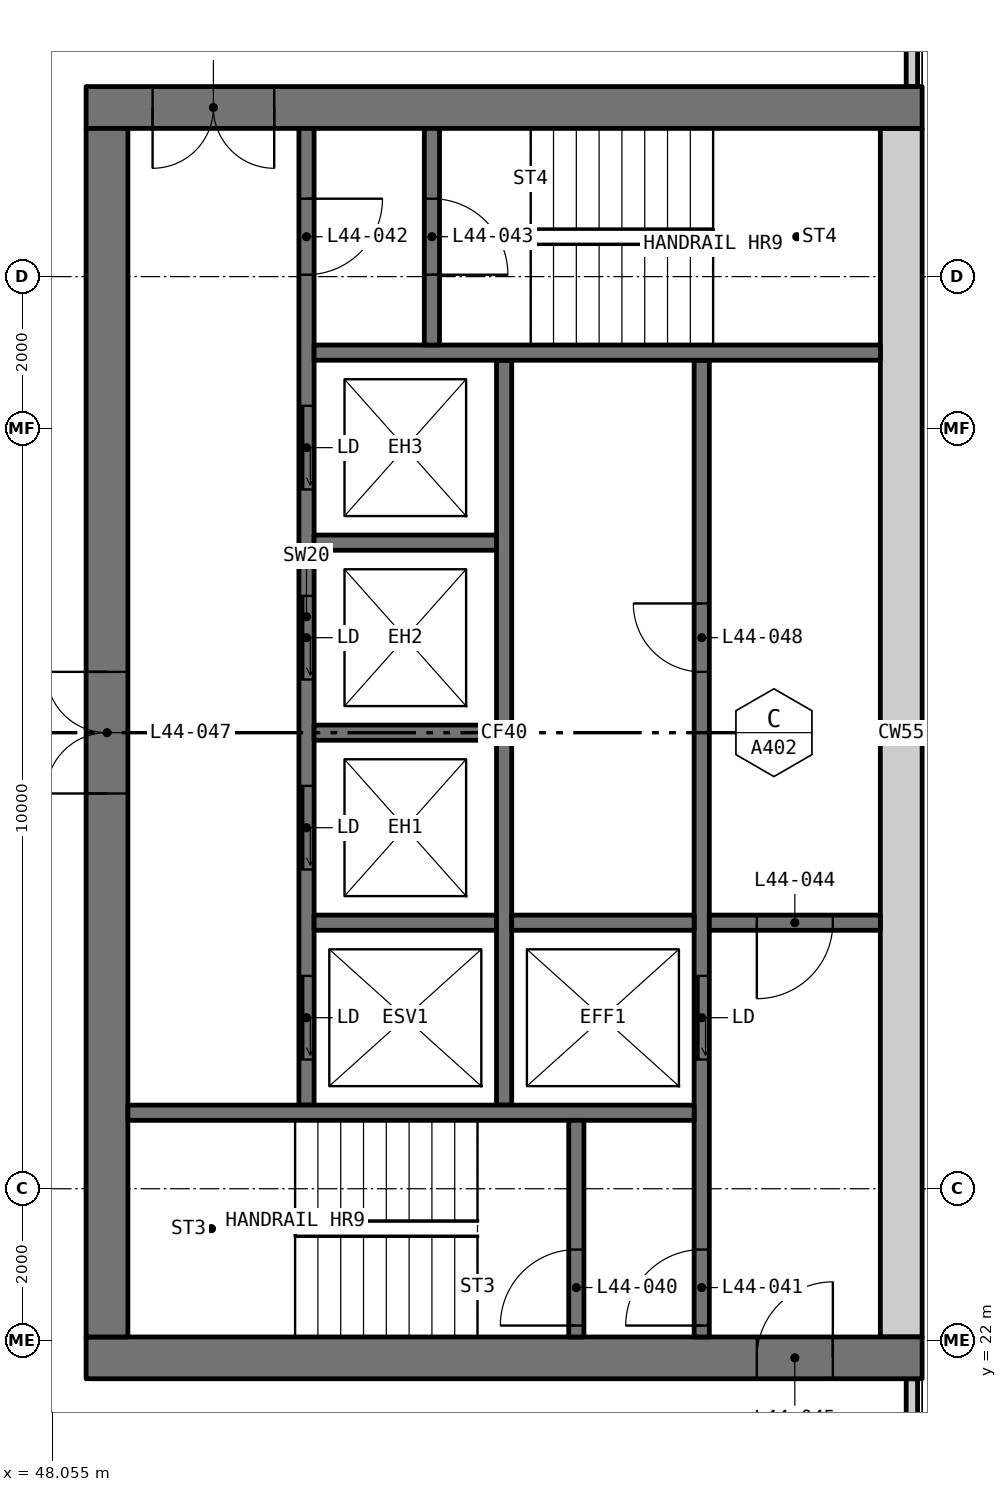
"""IFC4 building model, lengths in metres.
Left out: names, types, materials, properties, quantities, classifications, styles, units other than length and angle.
Written with IfcOpenShell. Run it as: python <this file> out.ifc"""

import sys

from ifc_helpers import new_model, si_unit, direction, frame, frame_2d, origin, place, context, subcontext, project, spatial, rectangle, extrude, element, fill, save


model = new_model("IFC4")
c1 = context("Model", 3, precision=1e-05, world=origin(), true_north=direction((0.0, 1.0)))
c2 = subcontext(c1, "Body", "Model", "MODEL_VIEW")
j1 = project(units=[si_unit("LENGTHUNIT", "METRE"), si_unit("PLANEANGLEUNIT", "RADIAN")], contexts=[c1])
p1 = place(None, origin())
s1 = spatial("IfcSite", under=j1, at=p1, CompositionType="ELEMENT")
p2 = place(p1, origin())
s2 = spatial("IfcBuilding", under=s1, at=p2, CompositionType="ELEMENT")
p3 = place(p2, frame((0.0, 0.0, 168.6)))
s3 = spatial("IfcBuildingStorey", under=s2, at=p3, CompositionType="ELEMENT", Elevation=168.6)
for number, where, z_axis, x_axis in (
    (1, (59.365, 18.71, 0.0), (0.0, 0.0, 1.0), (0.0, 1.0, 0.0)),
    (2, (59.365, 38.5, 0.0), (0.0, 0.0, 1.0), (0.0, 1.0, 0.0)),
):
    element("IfcWall", number, at=place(p3, frame(where, z_axis=z_axis, x_axis=x_axis)), inside=s3, PredefinedType="ELEMENTEDWALL", context=c2, shape_type="SweptSolid", body=[
        extrude(rectangle(XDim=2.79, YDim=0.15, at=frame_2d((1.395, 0.0))), origin(), (0.0, 0.0, 1.0), 3.05),
    ])
p4 = place(p3, frame((59.5, 21.775, 0.0), z_axis=(0.0, 0.0, 1.0), x_axis=(-1.0, 0.0, 0.0)))
e3 = element("IfcWall", 3, at=p4, inside=s3, PredefinedType="SHEAR", context=c2, shape_type="SweptSolid", body=[
    extrude(rectangle(XDim=11.0, YDim=0.55, at=frame_2d((5.5, 0.0))), origin(), (0.0, 0.0, 1.0), 3.05),
])
p5 = place(p4, frame((1.175, 0.0, 0.0)))
e4 = element("IfcOpeningElement", 4, at=p5, cuts=e3, PredefinedType="OPENING", context=c2, shape_type="SweptSolid", body=[
    extrude(rectangle(XDim=1.0, YDim=2.1, at=frame_2d((0.5, 1.05))), frame((0.0, 0.285, 0.0), z_axis=(0.0, -1.0, 0.0), x_axis=(1.0, 0.0, 0.0)), (0.0, 0.0, 1.0), 0.57),
])
p6 = place(p3, frame((59.5, 38.225, 0.0), z_axis=(0.0, 0.0, 1.0), x_axis=(-1.0, 0.0, 0.0)))
e5 = element("IfcWall", 5, at=p6, inside=s3, PredefinedType="SHEAR", context=c2, shape_type="SweptSolid", body=[
    extrude(rectangle(XDim=11.0, YDim=0.55, at=frame_2d((5.5, 0.0))), origin(), (0.0, 0.0, 1.0), 3.05),
])
p7 = place(p6, frame((8.525, 0.0, 0.0)))
e6 = element("IfcOpeningElement", 6, at=p7, cuts=e5, PredefinedType="OPENING", context=c2, shape_type="SweptSolid", body=[
    extrude(rectangle(XDim=1.6, YDim=2.1, at=frame_2d((0.8, 1.05))), frame((0.0, 0.285, 0.0), z_axis=(0.0, -1.0, 0.0), x_axis=(1.0, 0.0, 0.0)), (0.0, 0.0, 1.0), 0.57),
])
p8 = place(p3, frame((59.225, 22.05, 0.0), z_axis=(0.0, 0.0, 1.0), x_axis=(0.0, 1.0, 0.0)))
e7 = element("IfcWall", 7, at=p8, inside=s3, PredefinedType="SHEAR", context=c2, shape_type="SweptSolid", body=[
    extrude(rectangle(XDim=15.9, YDim=0.55, at=frame_2d((7.95, 0.0))), origin(), (0.0, 0.0, 1.0), 3.05),
])
p9 = place(p3, frame((48.775, 22.05, 0.0), z_axis=(0.0, 0.0, 1.0), x_axis=(0.0, 1.0, 0.0)))
e8 = element("IfcWall", 8, at=p9, inside=s3, PredefinedType="SHEAR", context=c2, shape_type="SweptSolid", body=[
    extrude(rectangle(XDim=15.9, YDim=0.55, at=frame_2d((7.95, 0.0))), origin(), (0.0, 0.0, 1.0), 3.05),
])
p10 = place(p9, frame((7.15, 0.0, 0.0)))
e9 = element("IfcOpeningElement", 9, at=p10, cuts=e8, PredefinedType="OPENING", context=c2, shape_type="SweptSolid", body=[
    extrude(rectangle(XDim=1.6, YDim=2.1, at=frame_2d((0.8, 1.05))), frame((0.0, 0.285, 0.0), z_axis=(0.0, -1.0, 0.0), x_axis=(1.0, 0.0, 0.0)), (0.0, 0.0, 1.0), 0.57),
])
p11 = place(p3, frame((56.6, 22.05, 0.0), z_axis=(0.0, 0.0, 1.0), x_axis=(0.0, 1.0, 0.0)))
e10 = element("IfcWall", 10, at=p11, inside=s3, PredefinedType="SOLIDWALL", context=c2, shape_type="SweptSolid", body=[
    extrude(rectangle(XDim=12.85, YDim=0.2, at=frame_2d((6.425, 0.0))), origin(), (0.0, 0.0, 1.0), 3.05),
])
p12 = place(p11, frame((3.65, 0.0, 0.0)))
e11 = element("IfcOpeningElement", 11, at=p12, cuts=e10, PredefinedType="OPENING", context=c2, shape_type="SweptSolid", body=[
    extrude(rectangle(XDim=1.1, YDim=2.1, at=frame_2d((0.55, 1.05))), frame((0.0, 0.11, 0.0), z_axis=(0.0, -1.0, 0.0), x_axis=(1.0, 0.0, 0.0)), (0.0, 0.0, 1.0), 0.22),
])
p13 = place(p11, frame((0.15, 0.0, 0.0)))
e12 = element("IfcOpeningElement", 12, at=p13, cuts=e10, PredefinedType="OPENING", context=c2, shape_type="SweptSolid", body=[
    extrude(rectangle(XDim=1.0, YDim=2.1, at=frame_2d((0.5, 1.05))), frame((0.0, 0.11, 0.0), z_axis=(0.0, -1.0, 0.0), x_axis=(1.0, 0.0, 0.0)), (0.0, 0.0, 1.0), 0.22),
])
p14 = place(p11, frame((8.75, 0.0, 0.0)))
e13 = element("IfcOpeningElement", 13, at=p14, cuts=e10, PredefinedType="OPENING", context=c2, shape_type="SweptSolid", body=[
    extrude(rectangle(XDim=0.9, YDim=2.1, at=frame_2d((0.45, 1.05))), frame((0.0, 0.11, 0.0), z_axis=(0.0, -1.0, 0.0), x_axis=(1.0, 0.0, 0.0)), (0.0, 0.0, 1.0), 0.22),
])
p15 = place(p3, frame((51.4, 25.1, 0.0), z_axis=(0.0, 0.0, 1.0), x_axis=(0.0, 1.0, 0.0)))
e14 = element("IfcWall", 14, at=p15, inside=s3, PredefinedType="SOLIDWALL", context=c2, shape_type="SweptSolid", body=[
    extrude(rectangle(XDim=12.85, YDim=0.2, at=frame_2d((6.425, 0.0))), origin(), (0.0, 0.0, 1.0), 3.05),
])
p16 = place(p15, frame((0.6, 0.0, 0.0)))
e15 = element("IfcOpeningElement", 15, at=p16, cuts=e14, PredefinedType="OPENING", context=c2, shape_type="SweptSolid", body=[
    extrude(rectangle(XDim=1.1, YDim=2.1, at=frame_2d((0.55, 1.05))), frame((0.0, 0.11, 0.0), z_axis=(0.0, -1.0, 0.0), x_axis=(1.0, 0.0, 0.0)), (0.0, 0.0, 1.0), 0.22),
])
p17 = place(p15, frame((3.1, 0.0, 0.0)))
e16 = element("IfcOpeningElement", 16, at=p17, cuts=e14, PredefinedType="OPENING", context=c2, shape_type="SweptSolid", body=[
    extrude(rectangle(XDim=1.1, YDim=2.1, at=frame_2d((0.55, 1.05))), frame((0.0, 0.11, 0.0), z_axis=(0.0, -1.0, 0.0), x_axis=(1.0, 0.0, 0.0)), (0.0, 0.0, 1.0), 0.22),
])
p18 = place(p15, frame((5.6, 0.0, 0.0)))
e17 = element("IfcOpeningElement", 17, at=p18, cuts=e14, PredefinedType="OPENING", context=c2, shape_type="SweptSolid", body=[
    extrude(rectangle(XDim=1.1, YDim=2.1, at=frame_2d((0.55, 1.05))), frame((0.0, 0.11, 0.0), z_axis=(0.0, -1.0, 0.0), x_axis=(1.0, 0.0, 0.0)), (0.0, 0.0, 1.0), 0.22),
])
p19 = place(p15, frame((8.1, 0.0, 0.0)))
e18 = element("IfcOpeningElement", 18, at=p19, cuts=e14, PredefinedType="OPENING", context=c2, shape_type="SweptSolid", body=[
    extrude(rectangle(XDim=1.1, YDim=2.1, at=frame_2d((0.55, 1.05))), frame((0.0, 0.11, 0.0), z_axis=(0.0, -1.0, 0.0), x_axis=(1.0, 0.0, 0.0)), (0.0, 0.0, 1.0), 0.22),
])
p20 = place(p15, frame((10.925, 0.0, 0.0)))
e19 = element("IfcOpeningElement", 19, at=p20, cuts=e14, PredefinedType="OPENING", context=c2, shape_type="SweptSolid", body=[
    extrude(rectangle(XDim=1.0, YDim=2.1, at=frame_2d((0.5, 1.05))), frame((0.0, 0.11, 0.0), z_axis=(0.0, -1.0, 0.0), x_axis=(1.0, 0.0, 0.0)), (0.0, 0.0, 1.0), 0.22),
])
p21 = place(p3, frame((54.0, 25.1, 0.0), z_axis=(0.0, 0.0, 1.0), x_axis=(0.0, 1.0, 0.0)))
e20 = element("IfcWall", 20, at=p21, inside=s3, PredefinedType="SOLIDWALL", context=c2, shape_type="SweptSolid", body=[
    extrude(rectangle(XDim=9.8, YDim=0.2, at=frame_2d((4.9, 0.0))), origin(), (0.0, 0.0, 1.0), 3.05),
])
for number, where, z_axis, x_axis in (
    (21, (56.5, 25.0, 0.0), (0.0, 0.0, 1.0), (-1.0, 0.0, 0.0)),
    (22, (58.95, 35.0, 0.0), (0.0, 0.0, 1.0), (-1.0, 0.0, 0.0)),
):
    element("IfcWall", number, at=place(p3, frame(where, z_axis=z_axis, x_axis=x_axis)), inside=s3, PredefinedType="SOLIDWALL", context=c2, shape_type="SweptSolid", body=[
        extrude(rectangle(XDim=7.45, YDim=0.2, at=frame_2d((3.725, 0.0))), origin(), (0.0, 0.0, 1.0), 3.05),
    ])
p22 = place(p3, frame((58.95, 27.5, 0.0), z_axis=(0.0, 0.0, 1.0), x_axis=(-1.0, 0.0, 0.0)))
e23 = element("IfcWall", 23, at=p22, inside=s3, PredefinedType="SOLIDWALL", context=c2, shape_type="SweptSolid", body=[
    extrude(rectangle(XDim=2.25, YDim=0.2, at=frame_2d((1.125, 0.0))), origin(), (0.0, 0.0, 1.0), 3.05),
])
p23 = place(p22, frame((0.625, 0.0, 0.0)))
e24 = element("IfcOpeningElement", 24, at=p23, cuts=e23, PredefinedType="OPENING", context=c2, shape_type="SweptSolid", body=[
    extrude(rectangle(XDim=1.0, YDim=2.1, at=frame_2d((0.5, 1.05))), frame((0.0, 0.11, 0.0), z_axis=(0.0, -1.0, 0.0), x_axis=(1.0, 0.0, 0.0)), (0.0, 0.0, 1.0), 0.22),
])
p24 = place(p3, frame((54.95, 22.05, 0.0), z_axis=(0.0, 0.0, 1.0), x_axis=(0.0, 1.0, 0.0)))
e25 = element("IfcWall", 25, at=p24, inside=s3, PredefinedType="SOLIDWALL", context=c2, shape_type="SweptSolid", body=[
    extrude(rectangle(XDim=2.85, YDim=0.2, at=frame_2d((1.425, 0.0))), origin(), (0.0, 0.0, 1.0), 3.05),
])
p25 = place(p24, frame((0.15, 0.0, 0.0)))
e26 = element("IfcOpeningElement", 26, at=p25, cuts=e25, PredefinedType="OPENING", context=c2, shape_type="SweptSolid", body=[
    extrude(rectangle(XDim=1.0, YDim=2.1, at=frame_2d((0.5, 1.05))), frame((0.0, 0.11, 0.0), z_axis=(0.0, -1.0, 0.0), x_axis=(1.0, 0.0, 0.0)), (0.0, 0.0, 1.0), 0.22),
])
p26 = place(p3, frame((53.05, 35.1, 0.0), z_axis=(0.0, 0.0, 1.0), x_axis=(0.0, 1.0, 0.0)))
e27 = element("IfcWall", 27, at=p26, inside=s3, PredefinedType="SOLIDWALL", context=c2, shape_type="SweptSolid", body=[
    extrude(rectangle(XDim=2.85, YDim=0.2, at=frame_2d((1.425, 0.0))), origin(), (0.0, 0.0, 1.0), 3.05),
])
p27 = place(p26, frame((0.925, 0.0, 0.0)))
e28 = element("IfcOpeningElement", 28, at=p27, cuts=e27, PredefinedType="OPENING", context=c2, shape_type="SweptSolid", body=[
    extrude(rectangle(XDim=1.0, YDim=2.1, at=frame_2d((0.5, 1.05))), frame((0.0, 0.11, 0.0), z_axis=(0.0, -1.0, 0.0), x_axis=(1.0, 0.0, 0.0)), (0.0, 0.0, 1.0), 0.22),
])
for number, where, z_axis, x_axis in (
    (29, (56.5, 27.5, 0.0), (0.0, 0.0, 1.0), (-1.0, 0.0, 0.0)),
    (30, (53.9, 27.5, 0.0), (0.0, 0.0, 1.0), (-1.0, 0.0, 0.0)),
    (31, (53.9, 30.0, 0.0), (0.0, 0.0, 1.0), (-1.0, 0.0, 0.0)),
    (32, (53.9, 32.5, 0.0), (0.0, 0.0, 1.0), (-1.0, 0.0, 0.0)),
):
    element("IfcWall", number, at=place(p3, frame(where, z_axis=z_axis, x_axis=x_axis)), inside=s3, PredefinedType="SOLIDWALL", context=c2, shape_type="SweptSolid", body=[
        extrude(rectangle(XDim=2.4, YDim=0.2, at=frame_2d((1.2, 0.0))), origin(), (0.0, 0.0, 1.0), 3.05),
    ])
p28 = place(p16, origin())
e33 = element("IfcDoor", 33, at=p28, inside=s3, OperationType="SLIDING_TO_LEFT", PredefinedType="DOOR", context=c2, shape_type="SweptSolid", body=[
    extrude(rectangle(XDim=1.1, YDim=2.1, at=frame_2d((0.55, 1.05))), frame((0.0, 0.025, 0.0), z_axis=(0.0, -1.0, 0.0), x_axis=(1.0, 0.0, 0.0)), (0.0, 0.0, 1.0), 0.05),
])
fill(e15, e33)
p29 = place(p17, origin())
e34 = element("IfcDoor", 34, at=p29, inside=s3, OperationType="SLIDING_TO_LEFT", PredefinedType="DOOR", context=c2, shape_type="SweptSolid", body=[
    extrude(rectangle(XDim=1.1, YDim=2.1, at=frame_2d((0.55, 1.05))), frame((0.0, 0.025, 0.0), z_axis=(0.0, -1.0, 0.0), x_axis=(1.0, 0.0, 0.0)), (0.0, 0.0, 1.0), 0.05),
])
fill(e16, e34)
p30 = place(p18, origin())
e35 = element("IfcDoor", 35, at=p30, inside=s3, OperationType="SLIDING_TO_LEFT", PredefinedType="DOOR", context=c2, shape_type="SweptSolid", body=[
    extrude(rectangle(XDim=1.1, YDim=2.1, at=frame_2d((0.55, 1.05))), frame((0.0, 0.025, 0.0), z_axis=(0.0, -1.0, 0.0), x_axis=(1.0, 0.0, 0.0)), (0.0, 0.0, 1.0), 0.05),
])
fill(e17, e35)
p31 = place(p19, origin())
e36 = element("IfcDoor", 36, at=p31, inside=s3, OperationType="SLIDING_TO_LEFT", PredefinedType="DOOR", context=c2, shape_type="SweptSolid", body=[
    extrude(rectangle(XDim=1.1, YDim=2.1, at=frame_2d((0.55, 1.05))), frame((0.0, 0.025, 0.0), z_axis=(0.0, -1.0, 0.0), x_axis=(1.0, 0.0, 0.0)), (0.0, 0.0, 1.0), 0.05),
])
fill(e18, e36)
p32 = place(p12, origin())
e37 = element("IfcDoor", 37, at=p32, inside=s3, OperationType="SLIDING_TO_LEFT", PredefinedType="DOOR", context=c2, shape_type="SweptSolid", body=[
    extrude(rectangle(XDim=1.1, YDim=2.1, at=frame_2d((0.55, 1.05))), frame((0.0, 0.025, 0.0), z_axis=(0.0, -1.0, 0.0), x_axis=(1.0, 0.0, 0.0)), (0.0, 0.0, 1.0), 0.05),
])
fill(e11, e37)
p33 = place(p25, origin())
e38 = element("IfcDoor", 38, at=p33, inside=s3, OperationType="SINGLE_SWING_RIGHT", PredefinedType="DOOR", context=c2, shape_type="SweptSolid", body=[
    extrude(rectangle(XDim=1.0, YDim=2.1, at=frame_2d((0.5, 1.05))), frame((0.0, 0.025, 0.0), z_axis=(0.0, -1.0, 0.0), x_axis=(1.0, 0.0, 0.0)), (0.0, 0.0, 1.0), 0.05),
])
fill(e26, e38)
p34 = place(p13, origin())
e39 = element("IfcDoor", 39, at=p34, inside=s3, OperationType="SINGLE_SWING_RIGHT", PredefinedType="DOOR", context=c2, shape_type="SweptSolid", body=[
    extrude(rectangle(XDim=1.0, YDim=2.1, at=frame_2d((0.5, 1.05))), frame((0.0, 0.025, 0.0), z_axis=(0.0, -1.0, 0.0), x_axis=(1.0, 0.0, 0.0)), (0.0, 0.0, 1.0), 0.05),
])
fill(e12, e39)
p35 = place(p20, frame((1.0, 0.0, 0.0), x_axis=(-1.0, 0.0, 0.0)))
e40 = element("IfcDoor", 40, at=p35, inside=s3, OperationType="SINGLE_SWING_RIGHT", PredefinedType="DOOR", context=c2, shape_type="SweptSolid", body=[
    extrude(rectangle(XDim=1.0, YDim=2.1, at=frame_2d((0.5, 1.05))), frame((0.0, 0.025, 0.0), z_axis=(0.0, -1.0, 0.0), x_axis=(1.0, 0.0, 0.0)), (0.0, 0.0, 1.0), 0.05),
])
fill(e19, e40)
p36 = place(p27, frame((1.0, 0.0, 0.0), x_axis=(-1.0, 0.0, 0.0)))
e41 = element("IfcDoor", 41, at=p36, inside=s3, OperationType="SINGLE_SWING_LEFT", PredefinedType="DOOR", context=c2, shape_type="SweptSolid", body=[
    extrude(rectangle(XDim=1.0, YDim=2.1, at=frame_2d((0.5, 1.05))), frame((0.0, 0.025, 0.0), z_axis=(0.0, -1.0, 0.0), x_axis=(1.0, 0.0, 0.0)), (0.0, 0.0, 1.0), 0.05),
])
fill(e28, e41)
p37 = place(p23, origin())
e42 = element("IfcDoor", 42, at=p37, inside=s3, OperationType="SINGLE_SWING_LEFT", PredefinedType="DOOR", context=c2, shape_type="SweptSolid", body=[
    extrude(rectangle(XDim=1.0, YDim=2.1, at=frame_2d((0.5, 1.05))), frame((0.0, 0.025, 0.0), z_axis=(0.0, -1.0, 0.0), x_axis=(1.0, 0.0, 0.0)), (0.0, 0.0, 1.0), 0.05),
])
fill(e24, e42)
p38 = place(p5, frame((1.0, 0.0, 0.0), x_axis=(-1.0, 0.0, 0.0)))
e43 = element("IfcDoor", 43, at=p38, inside=s3, OperationType="SINGLE_SWING_LEFT", PredefinedType="DOOR", context=c2, shape_type="SweptSolid", body=[
    extrude(rectangle(XDim=1.0, YDim=2.1, at=frame_2d((0.5, 1.05))), frame((0.0, 0.025, 0.0), z_axis=(0.0, -1.0, 0.0), x_axis=(1.0, 0.0, 0.0)), (0.0, 0.0, 1.0), 0.05),
])
fill(e4, e43)
p39 = place(p7, origin())
e44 = element("IfcDoor", 44, at=p39, inside=s3, OperationType="DOUBLE_DOOR_SINGLE_SWING", PredefinedType="DOOR", context=c2, shape_type="SweptSolid", body=[
    extrude(rectangle(XDim=1.6, YDim=2.1, at=frame_2d((0.8, 1.05))), frame((0.0, 0.025, 0.0), z_axis=(0.0, -1.0, 0.0), x_axis=(1.0, 0.0, 0.0)), (0.0, 0.0, 1.0), 0.05),
])
fill(e6, e44)
p40 = place(p10, origin())
e45 = element("IfcDoor", 45, at=p40, inside=s3, OperationType="DOUBLE_DOOR_SINGLE_SWING", PredefinedType="DOOR", context=c2, shape_type="SweptSolid", body=[
    extrude(rectangle(XDim=1.6, YDim=2.1, at=frame_2d((0.8, 1.05))), frame((0.0, 0.025, 0.0), z_axis=(0.0, -1.0, 0.0), x_axis=(1.0, 0.0, 0.0)), (0.0, 0.0, 1.0), 0.05),
])
fill(e9, e45)
p41 = place(p14, origin())
e46 = element("IfcDoor", 46, at=p41, inside=s3, OperationType="SINGLE_SWING_LEFT", PredefinedType="DOOR", context=c2, shape_type="SweptSolid", body=[
    extrude(rectangle(XDim=0.9, YDim=2.1, at=frame_2d((0.45, 1.05))), frame((0.0, 0.025, 0.0), z_axis=(0.0, -1.0, 0.0), x_axis=(1.0, 0.0, 0.0)), (0.0, 0.0, 1.0), 0.05),
])
fill(e13, e46)
save(model, sys.argv[1])
